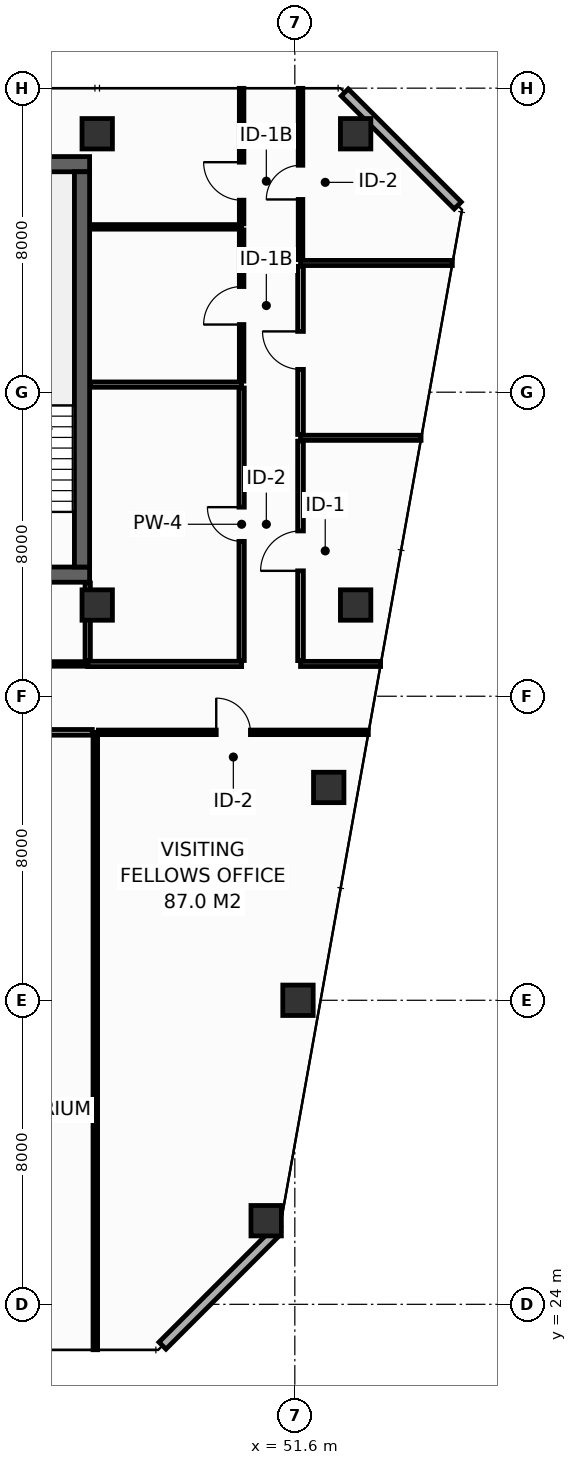
"""IFC4 building model, lengths in metres.
Left out: names, types, materials, properties, quantities, classifications, styles, units other than length and angle.
Written with IfcOpenShell. Run it as: python <this file> out.ifc"""

import sys

from ifc_helpers import new_model, si_unit, direction, frame, frame_2d, origin, origin_2d, place, context, subcontext, project, spatial, rectangle, hollow_rectangle, extrude, element, fill, save


model = new_model("IFC4")
c1 = context("Model", 3, precision=1e-05, world=origin(), true_north=direction((0.0, 1.0)))
c2 = subcontext(c1, "Body", "Model", "MODEL_VIEW")
j1 = project(units=[si_unit("LENGTHUNIT", "METRE"), si_unit("PLANEANGLEUNIT", "RADIAN")], contexts=[c1])
p1 = place(None, origin())
s1 = spatial("IfcSite", under=j1, at=p1, CompositionType="ELEMENT")
p2 = place(p1, origin())
s2 = spatial("IfcBuilding", under=s1, at=p2, CompositionType="ELEMENT")
p3 = place(p2, frame((0.0, 0.0, 257.2)))
s3 = spatial("IfcBuildingStorey", under=s2, at=p3, CompositionType="ELEMENT", Elevation=257.2)
p4 = place(p3, frame((13.7, 43.2, 0.0), z_axis=(0.0, 0.0, 1.0), x_axis=(1.0, 0.0, 0.0)))
e1 = element("IfcWall", 1, at=p4, inside=s3, PredefinedType="SHEAR", context=c2, shape_type="SweptSolid", body=[
    extrude(rectangle(XDim=32.5, YDim=0.4, at=frame_2d((16.25, 0.0))), origin(), (0.0, 0.0, 1.0), 3.55),
])
p5 = place(p4, frame((5.4, 0.0, 0.0)))
e2 = element("IfcOpeningElement", 2, at=p5, cuts=e1, PredefinedType="OPENING", context=c2, shape_type="SweptSolid", body=[
    extrude(rectangle(XDim=1.1, YDim=2.15, at=frame_2d((0.55, 1.075))), frame((0.0, 0.21, 0.0), z_axis=(0.0, -1.0, 0.0), x_axis=(1.0, 0.0, 0.0)), (0.0, 0.0, 1.0), 0.42),
])
p6 = place(p4, frame((25.6, 0.0, 0.0)))
e3 = element("IfcOpeningElement", 3, at=p6, cuts=e1, PredefinedType="OPENING", context=c2, shape_type="SweptSolid", body=[
    extrude(rectangle(XDim=1.1, YDim=2.15, at=frame_2d((0.55, 1.075))), frame((0.0, 0.21, 0.0), z_axis=(0.0, -1.0, 0.0), x_axis=(1.0, 0.0, 0.0)), (0.0, 0.0, 1.0), 0.42),
])
p7 = place(p3, frame((13.7, 54.0, 0.0), z_axis=(0.0, 0.0, 1.0), x_axis=(1.0, 0.0, 0.0)))
e4 = element("IfcWall", 4, at=p7, inside=s3, PredefinedType="SHEAR", context=c2, shape_type="SweptSolid", body=[
    extrude(rectangle(XDim=32.5, YDim=0.4, at=frame_2d((16.25, 0.0))), origin(), (0.0, 0.0, 1.0), 3.55),
])
p8 = place(p3, frame((46.0, 43.4, 0.0), z_axis=(0.0, 0.0, 1.0), x_axis=(0.0, 1.0, 0.0)))
e5 = element("IfcWall", 5, at=p8, inside=s3, PredefinedType="SHEAR", context=c2, shape_type="SweptSolid", body=[
    extrude(rectangle(XDim=10.4, YDim=0.4, at=frame_2d((5.2, 0.0))), origin(), (0.0, 0.0, 1.0), 3.55),
])
for number, where, z_axis, x_axis in (
    (6, (46.4, 54.8, 0.0), (0.0, 0.0, 1.0), (1.0, 0.0, 0.0)),
    (7, (53.2, 54.8, 0.0), (0.0, 0.0, 1.0), (1.0, 0.0, 0.0)),
    (8, (46.4, 42.4, 0.0), (0.0, 0.0, 1.0), (1.0, 0.0, 0.0)),
    (9, (53.2, 42.4, 0.0), (0.0, 0.0, 1.0), (1.0, 0.0, 0.0)),
    (10, (50.846, 26.2, 0.0), (0.0, 0.0, 1.0), (1.0, 0.0, 0.0)),
    (11, (51.683, 32.0, 0.0), (0.0, 0.0, 1.0), (1.0, 0.0, 0.0)),
    (12, (52.492, 37.6, 0.0), (0.0, 0.0, 1.0), (1.0, 0.0, 0.0)),
):
    element("IfcColumn", number, at=place(p3, frame(where, z_axis=z_axis, x_axis=x_axis)), inside=s3, PredefinedType="COLUMN", context=c2, shape_type="SweptSolid", body=[
        extrude(hollow_rectangle(XDim=0.8, YDim=0.8, WallThickness=0.036, at=origin_2d()), origin(), (0.0, 0.0, 1.0), 3.8),
    ])
for number, where, z_axis, x_axis in (
    (13, (48.117, 22.913, 0.0), (0.0, 0.0, 1.0), (0.707, 0.707, 0.0)),
    (14, (55.887, 52.913, 0.0), (0.0, 0.0, 1.0), (-0.707, 0.707, 0.0)),
):
    element("IfcWall", number, at=place(p3, frame(where, z_axis=z_axis, x_axis=x_axis)), inside=s3, PredefinedType="STANDARD", context=c2, shape_type="SweptSolid", body=[
        extrude(rectangle(XDim=4.206, YDim=0.26, at=frame_2d((2.103, 0.0))), origin(), (0.0, 0.0, 1.0), 3.55),
    ])
p9 = place(p3, frame((46.15, 40.85, 0.0), z_axis=(0.0, 0.0, 1.0), x_axis=(1.0, 0.0, 0.0)))
e15 = element("IfcWall", 15, at=p9, inside=s3, PredefinedType="PARTITIONING", context=c2, shape_type="SweptSolid", body=[
    extrude(rectangle(XDim=4.05, YDim=0.14, at=frame_2d((2.025, 0.0))), origin(), (0.0, 0.0, 1.0), 3.55),
])
p10 = place(p3, frame((46.15, 40.94, 0.0), z_axis=(0.0, 0.0, 1.0), x_axis=(0.0, 1.0, 0.0)))
e16 = element("IfcWall", 16, at=p10, inside=s3, PredefinedType="PARTITIONING", context=c2, shape_type="SweptSolid", body=[
    extrude(rectangle(XDim=2.04, YDim=0.14, at=frame_2d((1.02, 0.0))), origin(), (0.0, 0.0, 1.0), 3.55),
])
p11 = place(p3, frame((46.22, 48.2, 0.0), z_axis=(0.0, 0.0, 1.0), x_axis=(1.0, 0.0, 0.0)))
e17 = element("IfcWall", 17, at=p11, inside=s3, PredefinedType="PARTITIONING", context=c2, shape_type="SweptSolid", body=[
    extrude(rectangle(XDim=3.98, YDim=0.14, at=frame_2d((1.99, 0.0))), origin(), (0.0, 0.0, 1.0), 3.55),
])
p12 = place(p3, frame((50.2, 40.94, 0.0), z_axis=(0.0, 0.0, 1.0), x_axis=(0.0, 1.0, 0.0)))
e18 = element("IfcWall", 18, at=p12, inside=s3, PredefinedType="PARTITIONING", context=c2, shape_type="SweptSolid", body=[
    extrude(rectangle(XDim=7.17, YDim=0.14, at=frame_2d((3.585, 0.0))), origin(), (0.0, 0.0, 1.0), 2.947),
])
p13 = place(p12, frame((3.135, 0.0, 0.0)))
e19 = element("IfcOpeningElement", 19, at=p13, cuts=e18, PredefinedType="OPENING", context=c2, shape_type="SweptSolid", body=[
    extrude(rectangle(XDim=0.9, YDim=2.1, at=frame_2d((0.45, 1.05))), frame((0.0, 0.08, 0.0), z_axis=(0.0, -1.0, 0.0), x_axis=(1.0, 0.0, 0.0)), (0.0, 0.0, 1.0), 0.16),
])
p14 = place(p3, frame((46.22, 52.35, 0.0), z_axis=(0.0, 0.0, 1.0), x_axis=(1.0, 0.0, 0.0)))
e20 = element("IfcWall", 20, at=p14, inside=s3, PredefinedType="PARTITIONING", context=c2, shape_type="SweptSolid", body=[
    extrude(rectangle(XDim=3.98, YDim=0.12, at=frame_2d((1.99, 0.0))), origin(), (0.0, 0.0, 1.0), 3.55),
])
p15 = place(p3, frame((50.2, 48.29, 0.0), z_axis=(0.0, 0.0, 1.0), x_axis=(0.0, 1.0, 0.0)))
e21 = element("IfcWall", 21, at=p15, inside=s3, PredefinedType="PARTITIONING", context=c2, shape_type="SweptSolid", body=[
    extrude(rectangle(XDim=3.98, YDim=0.12, at=frame_2d((1.99, 0.0))), origin(), (0.0, 0.0, 1.0), 3.55),
])
p16 = place(p15, frame((1.49, 0.0, 0.0)))
e22 = element("IfcOpeningElement", 22, at=p16, cuts=e21, PredefinedType="OPENING", context=c2, shape_type="SweptSolid", body=[
    extrude(rectangle(XDim=1.0, YDim=2.15, at=frame_2d((0.5, 1.075))), frame((0.0, 0.07, 0.0), z_axis=(0.0, -1.0, 0.0), x_axis=(1.0, 0.0, 0.0)), (0.0, 0.0, 1.0), 0.14),
])
p17 = place(p3, frame((50.2, 52.43, 0.0), z_axis=(0.0, 0.0, 1.0), x_axis=(0.0, 1.0, 0.0)))
e23 = element("IfcWall", 23, at=p17, inside=s3, PredefinedType="PARTITIONING", context=c2, shape_type="SweptSolid", body=[
    extrude(rectangle(XDim=3.565, YDim=0.12, at=frame_2d((1.783, 0.0))), origin(), (0.0, 0.0, 1.0), 2.935),
])
p18 = place(p17, frame((0.622, 0.0, 0.0)))
e24 = element("IfcOpeningElement", 24, at=p18, cuts=e23, PredefinedType="OPENING", context=c2, shape_type="SweptSolid", body=[
    extrude(rectangle(XDim=1.0, YDim=2.15, at=frame_2d((0.5, 1.075))), frame((0.0, 0.07, 0.0), z_axis=(0.0, -1.0, 0.0), x_axis=(1.0, 0.0, 0.0)), (0.0, 0.0, 1.0), 0.14),
])
p19 = place(p3, frame((51.75, 40.85, 0.0), z_axis=(0.0, 0.0, 1.0), x_axis=(1.0, 0.0, 0.0)))
e25 = element("IfcWall", 25, at=p19, inside=s3, PredefinedType="PARTITIONING", context=c2, shape_type="SweptSolid", body=[
    extrude(rectangle(XDim=2.107, YDim=0.135, at=frame_2d((1.053, 0.0))), origin(), (0.0, 0.0, 1.0), 3.085),
])
p20 = place(p3, frame((51.75, 46.8, 0.0), z_axis=(0.0, 0.0, 1.0), x_axis=(1.0, 0.0, 0.0)))
e26 = element("IfcWall", 26, at=p20, inside=s3, PredefinedType="PARTITIONING", context=c2, shape_type="SweptSolid", body=[
    extrude(rectangle(XDim=3.171, YDim=0.135, at=frame_2d((1.586, 0.0))), origin(), (0.0, 0.0, 1.0), 2.947),
])
p21 = place(p3, frame((51.75, 51.4, 0.0), z_axis=(0.0, 0.0, 1.0), x_axis=(1.0, 0.0, 0.0)))
e27 = element("IfcWall", 27, at=p21, inside=s3, PredefinedType="PARTITIONING", context=c2, shape_type="SweptSolid", body=[
    extrude(rectangle(XDim=3.994, YDim=0.135, at=frame_2d((1.997, 0.0))), origin(), (0.0, 0.0, 1.0), 2.947),
])
p22 = place(p3, frame((51.75, 40.938, 0.0), z_axis=(0.0, 0.0, 1.0), x_axis=(0.0, 1.0, 0.0)))
e28 = element("IfcWall", 28, at=p22, inside=s3, PredefinedType="PARTITIONING", context=c2, shape_type="SweptSolid", body=[
    extrude(rectangle(XDim=5.775, YDim=0.15, at=frame_2d((2.887, 0.0))), origin(), (0.0, 0.0, 1.0), 2.947),
])
p23 = place(p22, frame((2.362, 0.0, 0.0)))
e29 = element("IfcOpeningElement", 29, at=p23, cuts=e28, PredefinedType="OPENING", context=c2, shape_type="SweptSolid", body=[
    extrude(rectangle(XDim=1.05, YDim=2.15, at=frame_2d((0.525, 1.075))), frame((0.0, 0.085, 0.0), z_axis=(0.0, -1.0, 0.0), x_axis=(1.0, 0.0, 0.0)), (0.0, 0.0, 1.0), 0.17),
])
p24 = place(p3, frame((51.75, 46.887, 0.0), z_axis=(0.0, 0.0, 1.0), x_axis=(0.0, 1.0, 0.0)))
e30 = element("IfcWall", 30, at=p24, inside=s3, PredefinedType="PARTITIONING", context=c2, shape_type="SweptSolid", body=[
    extrude(rectangle(XDim=4.425, YDim=0.15, at=frame_2d((2.212, 0.0))), origin(), (0.0, 0.0, 1.0), 3.55),
])
p25 = place(p24, frame((1.712, 0.0, 0.0)))
e31 = element("IfcOpeningElement", 31, at=p25, cuts=e30, PredefinedType="OPENING", context=c2, shape_type="SweptSolid", body=[
    extrude(rectangle(XDim=1.0, YDim=2.15, at=frame_2d((0.5, 1.075))), frame((0.0, 0.085, 0.0), z_axis=(0.0, -1.0, 0.0), x_axis=(1.0, 0.0, 0.0)), (0.0, 0.0, 1.0), 0.17),
])
p26 = place(p3, frame((51.75, 51.488, 0.0), z_axis=(0.0, 0.0, 1.0), x_axis=(0.0, 1.0, 0.0)))
e32 = element("IfcWall", 32, at=p26, inside=s3, PredefinedType="PARTITIONING", context=c2, shape_type="SweptSolid", body=[
    extrude(rectangle(XDim=4.508, YDim=0.12, at=frame_2d((2.254, 0.0))), origin(), (0.0, 0.0, 1.0), 2.935),
])
p27 = place(p26, frame((1.584, 0.0, 0.0)))
e33 = element("IfcOpeningElement", 33, at=p27, cuts=e32, PredefinedType="OPENING", context=c2, shape_type="SweptSolid", body=[
    extrude(rectangle(XDim=0.9, YDim=2.1, at=frame_2d((0.45, 1.05))), frame((0.0, 0.07, 0.0), z_axis=(0.0, -1.0, 0.0), x_axis=(1.0, 0.0, 0.0)), (0.0, 0.0, 1.0), 0.14),
])
p28 = place(p3, frame((40.995, 40.85, 0.0), z_axis=(0.0, 0.0, 1.0), x_axis=(1.0, 0.0, 0.0)))
e34 = element("IfcWall", 34, at=p28, inside=s3, PredefinedType="PARTITIONING", context=c2, shape_type="SweptSolid", body=[
    extrude(rectangle(XDim=5.155, YDim=0.12, at=frame_2d((2.577, 0.0))), origin(), (0.0, 0.0, 1.0), 3.55),
])
p29 = place(p28, frame((2.078, 0.0, 0.0)))
e35 = element("IfcOpeningElement", 35, at=p29, cuts=e34, PredefinedType="OPENING", context=c2, shape_type="SweptSolid", body=[
    extrude(rectangle(XDim=1.0, YDim=2.15, at=frame_2d((0.5, 1.075))), frame((0.0, 0.07, 0.0), z_axis=(0.0, -1.0, 0.0), x_axis=(1.0, 0.0, 0.0)), (0.0, 0.0, 1.0), 0.14),
])
p30 = place(p3, frame((46.35, 22.805, 0.0), z_axis=(0.0, 0.0, 1.0), x_axis=(0.0, 1.0, 0.0)))
e36 = element("IfcWall", 36, at=p30, inside=s3, PredefinedType="PARTITIONING", context=c2, shape_type="SweptSolid", body=[
    extrude(rectangle(XDim=16.245, YDim=0.12, at=frame_2d((8.123, 0.0))), origin(), (0.0, 0.0, 1.0), 2.947),
])
p31 = place(p3, frame((40.208, 39.05, 0.0), z_axis=(0.0, 0.0, 1.0), x_axis=(1.0, 0.0, 0.0)))
e37 = element("IfcWall", 37, at=p31, inside=s3, PredefinedType="PARTITIONING", context=c2, shape_type="SweptSolid", body=[
    extrude(rectangle(XDim=6.062, YDim=0.15, at=frame_2d((3.031, 0.0))), origin(), (0.0, 0.0, 1.0), 3.55),
])
p32 = place(p31, frame((2.531, 0.0, 0.0)))
e38 = element("IfcOpeningElement", 38, at=p32, cuts=e37, PredefinedType="OPENING", context=c2, shape_type="SweptSolid", body=[
    extrude(rectangle(XDim=1.0, YDim=2.15, at=frame_2d((0.5, 1.075))), frame((0.0, 0.085, 0.0), z_axis=(0.0, -1.0, 0.0), x_axis=(1.0, 0.0, 0.0)), (0.0, 0.0, 1.0), 0.17),
])
p33 = place(p3, frame((46.43, 39.05, 0.0), z_axis=(0.0, 0.0, 1.0), x_axis=(1.0, 0.0, 0.0)))
e39 = element("IfcWall", 39, at=p33, inside=s3, PredefinedType="PARTITIONING", context=c2, shape_type="SweptSolid", body=[
    extrude(rectangle(XDim=7.104, YDim=0.12, at=frame_2d((3.552, 0.0))), origin(), (0.0, 0.0, 1.0), 3.085),
])
p34 = place(p33, frame((3.102, 0.0, 0.0)))
e40 = element("IfcOpeningElement", 40, at=p34, cuts=e39, PredefinedType="OPENING", context=c2, shape_type="SweptSolid", body=[
    extrude(rectangle(XDim=0.9, YDim=2.1, at=frame_2d((0.45, 1.05))), frame((0.0, 0.07, 0.0), z_axis=(0.0, -1.0, 0.0), x_axis=(1.0, 0.0, 0.0)), (0.0, 0.0, 1.0), 0.14),
])
p35 = place(p13, origin())
e41 = element("IfcDoor", 41, at=p35, inside=s3, OperationType="SINGLE_SWING_RIGHT", PredefinedType="DOOR", context=c2, shape_type="SweptSolid", body=[
    extrude(rectangle(XDim=0.9, YDim=2.1, at=frame_2d((0.45, 1.05))), frame((0.0, 0.025, 0.0), z_axis=(0.0, -1.0, 0.0), x_axis=(1.0, 0.0, 0.0)), (0.0, 0.0, 1.0), 0.05),
])
fill(e19, e41)
p36 = place(p16, origin())
e42 = element("IfcDoor", 42, at=p36, inside=s3, OperationType="SINGLE_SWING_LEFT", PredefinedType="DOOR", context=c2, shape_type="SweptSolid", body=[
    extrude(rectangle(XDim=1.0, YDim=2.15, at=frame_2d((0.5, 1.075))), frame((0.0, 0.025, 0.0), z_axis=(0.0, -1.0, 0.0), x_axis=(1.0, 0.0, 0.0)), (0.0, 0.0, 1.0), 0.05),
])
fill(e22, e42)
p37 = place(p18, origin())
e43 = element("IfcDoor", 43, at=p37, inside=s3, OperationType="SINGLE_SWING_RIGHT", PredefinedType="DOOR", context=c2, shape_type="SweptSolid", body=[
    extrude(rectangle(XDim=1.0, YDim=2.15, at=frame_2d((0.5, 1.075))), frame((0.0, 0.025, 0.0), z_axis=(0.0, -1.0, 0.0), x_axis=(1.0, 0.0, 0.0)), (0.0, 0.0, 1.0), 0.05),
])
fill(e24, e43)
p38 = place(p23, origin())
e44 = element("IfcDoor", 44, at=p38, inside=s3, OperationType="SINGLE_SWING_LEFT", PredefinedType="DOOR", context=c2, shape_type="SweptSolid", body=[
    extrude(rectangle(XDim=1.05, YDim=2.15, at=frame_2d((0.525, 1.075))), frame((0.0, 0.025, 0.0), z_axis=(0.0, -1.0, 0.0), x_axis=(1.0, 0.0, 0.0)), (0.0, 0.0, 1.0), 0.05),
])
fill(e29, e44)
p39 = place(p25, origin())
e45 = element("IfcDoor", 45, at=p39, inside=s3, OperationType="SINGLE_SWING_RIGHT", PredefinedType="DOOR", context=c2, shape_type="SweptSolid", body=[
    extrude(rectangle(XDim=1.0, YDim=2.15, at=frame_2d((0.5, 1.075))), frame((0.0, 0.025, 0.0), z_axis=(0.0, -1.0, 0.0), x_axis=(1.0, 0.0, 0.0)), (0.0, 0.0, 1.0), 0.05),
])
fill(e31, e45)
p40 = place(p27, origin())
e46 = element("IfcDoor", 46, at=p40, inside=s3, OperationType="SINGLE_SWING_LEFT", PredefinedType="DOOR", context=c2, shape_type="SweptSolid", body=[
    extrude(rectangle(XDim=0.9, YDim=2.1, at=frame_2d((0.45, 1.05))), frame((0.0, 0.025, 0.0), z_axis=(0.0, -1.0, 0.0), x_axis=(1.0, 0.0, 0.0)), (0.0, 0.0, 1.0), 0.05),
])
fill(e33, e46)
p41 = place(p34, origin())
e47 = element("IfcDoor", 47, at=p41, inside=s3, OperationType="SINGLE_SWING_LEFT", PredefinedType="DOOR", context=c2, shape_type="SweptSolid", body=[
    extrude(rectangle(XDim=0.9, YDim=2.1, at=frame_2d((0.45, 1.05))), frame((0.0, 0.025, 0.0), z_axis=(0.0, -1.0, 0.0), x_axis=(1.0, 0.0, 0.0)), (0.0, 0.0, 1.0), 0.05),
])
fill(e40, e47)
save(model, sys.argv[1])
